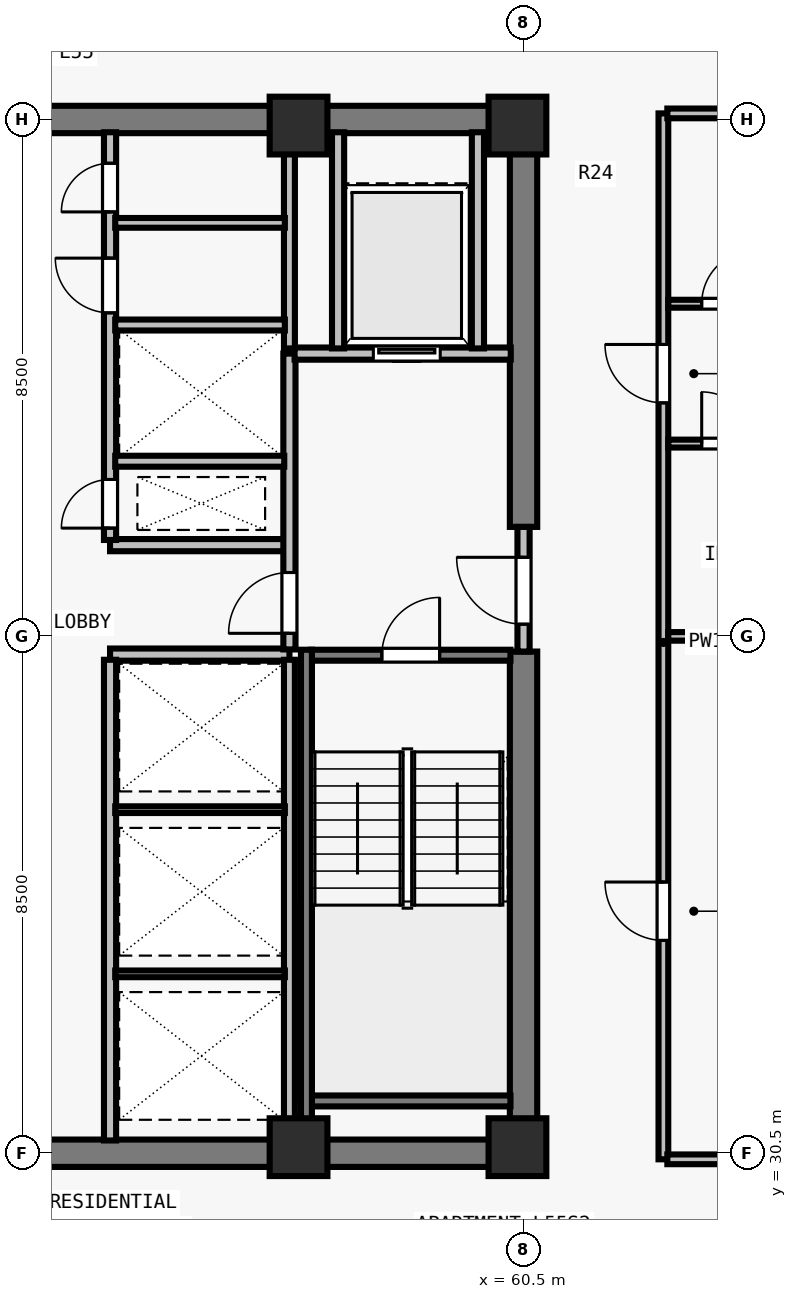
"""IFC4 building model, lengths in metres.
Left out: names, types, materials, properties, quantities, classifications, styles, units other than length and angle.
Written with IfcOpenShell. Run it as: python <this file> out.ifc"""

import sys

from ifc_helpers import new_model, si_unit, direction, frame, frame_2d, origin, origin_2d, place, context, subcontext, project, spatial, rectangle, extrude, element, fill, save


model = new_model("IFC4")
c1 = context("Model", 3, precision=1e-05, world=origin(), true_north=direction((0.0, 1.0)))
c2 = subcontext(c1, "Body", "Model", "MODEL_VIEW")
j1 = project(units=[si_unit("LENGTHUNIT", "METRE"), si_unit("PLANEANGLEUNIT", "RADIAN")], contexts=[c1])
p1 = place(None, origin())
s1 = spatial("IfcSite", under=j1, at=p1, CompositionType="ELEMENT")
p2 = place(p1, origin())
s2 = spatial("IfcBuilding", under=s1, at=p2, CompositionType="ELEMENT")
p3 = place(p2, frame((0.0, 0.0, 202.5)))
s3 = spatial("IfcBuildingStorey", under=s2, at=p3, CompositionType="ELEMENT", Elevation=202.5)
for number, where, z_axis, x_axis in (
    (1, (56.8, 30.6, 0.0), (0.0, 0.0, 1.0), (1.0, 0.0, 0.0)),
    (2, (60.4, 30.6, 0.0), (0.0, 0.0, 1.0), (1.0, 0.0, 0.0)),
    (3, (56.8, 47.4, 0.0), (0.0, 0.0, 1.0), (1.0, 0.0, 0.0)),
    (4, (60.4, 47.4, 0.0), (0.0, 0.0, 1.0), (1.0, 0.0, 0.0)),
):
    element("IfcColumn", number, at=place(p3, frame(where, z_axis=z_axis, x_axis=x_axis)), inside=s3, PredefinedType="COLUMN", context=c2, shape_type="SweptSolid", body=[
        extrude(rectangle(XDim=0.95, YDim=0.95, at=origin_2d()), origin(), (0.0, 0.0, 1.0), 3.5),
    ])
for number, where, z_axis, x_axis in (
    (5, (43.275, 30.5, 0.0), (0.0, 0.0, 1.0), (1.0, 0.0, 0.0)),
    (6, (43.275, 47.5, 0.0), (0.0, 0.0, 1.0), (1.0, 0.0, 0.0)),
):
    element("IfcWall", number, at=place(p3, frame(where, z_axis=z_axis, x_axis=x_axis)), inside=s3, PredefinedType="SHEAR", context=c2, shape_type="SweptSolid", body=[
        extrude(rectangle(XDim=17.45, YDim=0.45, at=frame_2d((8.725, 0.0))), origin(), (0.0, 0.0, 1.0), 3.29),
    ])
p4 = place(p3, frame((60.5, 30.715, 0.0), z_axis=(0.0, 0.0, 1.0), x_axis=(0.0, 1.0, 0.0)))
e7 = element("IfcWall", 7, at=p4, inside=s3, PredefinedType="SHEAR", context=c2, shape_type="SweptSolid", body=[
    extrude(rectangle(XDim=8.035, YDim=0.45, at=frame_2d((4.018, 0.0))), origin(), (0.0, 0.0, 1.0), 3.29),
])
p5 = place(p3, frame((60.5, 40.8, 0.0), z_axis=(0.0, 0.0, 1.0), x_axis=(0.0, 1.0, 0.0)))
e8 = element("IfcWall", 8, at=p5, inside=s3, PredefinedType="SHEAR", context=c2, shape_type="SweptSolid", body=[
    extrude(rectangle(XDim=6.485, YDim=0.45, at=frame_2d((3.242, 0.0))), origin(), (0.0, 0.0, 1.0), 3.29),
])
for number, where, z_axis, x_axis in (
    (9, (53.7, 38.7, 0.0), (0.0, 0.0, 1.0), (1.0, 0.0, 0.0)),
    (10, (53.7, 40.5, 0.0), (0.0, 0.0, 1.0), (1.0, 0.0, 0.0)),
):
    element("IfcWall", number, at=place(p3, frame(where, z_axis=z_axis, x_axis=x_axis)), inside=s3, PredefinedType="SOLIDWALL", context=c2, shape_type="SweptSolid", body=[
        extrude(rectangle(XDim=2.95, YDim=0.2, at=frame_2d((1.475, 0.0))), origin(), (0.0, 0.0, 1.0), 3.29),
    ])
p6 = place(p3, frame((53.7, 30.71, 0.0), z_axis=(0.0, 0.0, 1.0), x_axis=(0.0, 1.0, 0.0)))
e11 = element("IfcWall", 11, at=p6, inside=s3, PredefinedType="SOLIDWALL", context=c2, shape_type="SweptSolid", body=[
    extrude(rectangle(XDim=7.905, YDim=0.2, at=frame_2d((3.953, 0.0))), origin(), (0.0, 0.0, 1.0), 3.29),
])
p7 = place(p3, frame((53.7, 40.585, 0.0), z_axis=(0.0, 0.0, 1.0), x_axis=(0.0, 1.0, 0.0)))
e12 = element("IfcWall", 12, at=p7, inside=s3, PredefinedType="SOLIDWALL", context=c2, shape_type="SweptSolid", body=[
    extrude(rectangle(XDim=6.705, YDim=0.2, at=frame_2d((3.353, 0.0))), origin(), (0.0, 0.0, 1.0), 3.29),
])
p8 = place(p7, frame((0.195, 0.0, 0.0)))
e13 = element("IfcOpeningElement", 13, at=p8, cuts=e12, PredefinedType="OPENING", context=c2, shape_type="SweptSolid", body=[
    extrude(rectangle(XDim=0.8, YDim=2.08, at=frame_2d((0.4, 1.04))), frame((0.0, 0.11, 0.0), z_axis=(0.0, -1.0, 0.0), x_axis=(1.0, 0.0, 0.0)), (0.0, 0.0, 1.0), 0.22),
])
p9 = place(p7, frame((3.735, 0.0, 0.0)))
e14 = element("IfcOpeningElement", 14, at=p9, cuts=e12, PredefinedType="OPENING", context=c2, shape_type="SweptSolid", body=[
    extrude(rectangle(XDim=0.9, YDim=2.12, at=frame_2d((0.45, 1.06))), frame((0.0, 0.11, 0.0), z_axis=(0.0, -1.0, 0.0), x_axis=(1.0, 0.0, 0.0)), (0.0, 0.0, 1.0), 0.22),
])
p10 = place(p7, frame((5.395, 0.0, 0.0)))
e15 = element("IfcOpeningElement", 15, at=p10, cuts=e12, PredefinedType="OPENING", context=c2, shape_type="SweptSolid", body=[
    extrude(rectangle(XDim=0.8, YDim=2.1, at=frame_2d((0.4, 1.05))), frame((0.0, 0.11, 0.0), z_axis=(0.0, -1.0, 0.0), x_axis=(1.0, 0.0, 0.0)), (0.0, 0.0, 1.0), 0.22),
])
p11 = place(p3, frame((60.5, 38.75, 0.0), z_axis=(0.0, 0.0, 1.0), x_axis=(0.0, 1.0, 0.0)))
e16 = element("IfcWall", 16, at=p11, inside=s3, PredefinedType="SOLIDWALL", context=c2, shape_type="SweptSolid", body=[
    extrude(rectangle(XDim=2.05, YDim=0.2, at=frame_2d((1.025, 0.0))), origin(), (0.0, 0.0, 1.0), 3.29),
])
p12 = place(p11, frame((0.45, 0.0, 0.0)))
e17 = element("IfcOpeningElement", 17, at=p12, cuts=e16, PredefinedType="OPENING", context=c2, shape_type="SweptSolid", body=[
    extrude(rectangle(XDim=1.1, YDim=2.15, at=frame_2d((0.55, 1.075))), frame((0.0, 0.11, 0.0), z_axis=(0.0, -1.0, 0.0), x_axis=(1.0, 0.0, 0.0)), (0.0, 0.0, 1.0), 0.22),
])
p13 = place(p3, frame((56.65, 38.785, 0.0), z_axis=(0.0, 0.0, 1.0), x_axis=(0.0, 1.0, 0.0)))
e18 = element("IfcWall", 18, at=p13, inside=s3, PredefinedType="SOLIDWALL", context=c2, shape_type="SweptSolid", body=[
    extrude(rectangle(XDim=4.865, YDim=0.2, at=frame_2d((2.433, 0.0))), origin(), (0.0, 0.0, 1.0), 3.29),
])
p14 = place(p13, frame((0.265, 0.0, 0.0)))
e19 = element("IfcOpeningElement", 19, at=p14, cuts=e18, PredefinedType="OPENING", context=c2, shape_type="SweptSolid", body=[
    extrude(rectangle(XDim=1.0, YDim=2.15, at=frame_2d((0.5, 1.075))), frame((0.0, 0.11, 0.0), z_axis=(0.0, -1.0, 0.0), x_axis=(1.0, 0.0, 0.0)), (0.0, 0.0, 1.0), 0.22),
])
p15 = place(p3, frame((56.735, 43.65, 0.0), z_axis=(0.0, 0.0, 1.0), x_axis=(1.0, 0.0, 0.0)))
e20 = element("IfcWall", 20, at=p15, inside=s3, PredefinedType="SOLIDWALL", context=c2, shape_type="SweptSolid", body=[
    extrude(rectangle(XDim=3.555, YDim=0.2, at=frame_2d((1.777, 0.0))), origin(), (0.0, 0.0, 1.0), 3.29),
])
p16 = place(p15, frame((1.295, 0.0, 0.0)))
e21 = element("IfcOpeningElement", 21, at=p16, cuts=e20, PredefinedType="OPENING", context=c2, shape_type="SweptSolid", body=[
    extrude(rectangle(XDim=1.1, YDim=2.2, at=frame_2d((0.55, 1.1))), frame((0.0, 0.11, 0.0), z_axis=(0.0, -1.0, 0.0), x_axis=(1.0, 0.0, 0.0)), (0.0, 0.0, 1.0), 0.22),
])
for number, where, z_axis, x_axis in (
    (22, (57.45, 43.735, 0.0), (0.0, 0.0, 1.0), (0.0, 1.0, 0.0)),
    (23, (59.75, 43.735, 0.0), (0.0, 0.0, 1.0), (0.0, 1.0, 0.0)),
):
    element("IfcWall", number, at=place(p3, frame(where, z_axis=z_axis, x_axis=x_axis)), inside=s3, PredefinedType="SOLIDWALL", context=c2, shape_type="SweptSolid", body=[
        extrude(rectangle(XDim=3.555, YDim=0.2, at=frame_2d((1.777, 0.0))), origin(), (0.0, 0.0, 1.0), 3.29),
    ])
p17 = place(p3, frame((56.65, 30.71, 0.0), z_axis=(0.0, 0.0, 1.0), x_axis=(0.0, 1.0, 0.0)))
e24 = element("IfcWall", 24, at=p17, inside=s3, PredefinedType="SOLIDWALL", context=c2, shape_type="SweptSolid", body=[
    extrude(rectangle(XDim=7.905, YDim=0.18, at=frame_2d((3.953, 0.0))), origin(), (0.0, 0.0, 1.0), 3.29),
])
for number, where, z_axis, x_axis in (
    (25, (53.785, 33.45, 0.0), (0.0, 0.0, 1.0), (1.0, 0.0, 0.0)),
    (26, (53.785, 36.15, 0.0), (0.0, 0.0, 1.0), (1.0, 0.0, 0.0)),
):
    element("IfcWall", number, at=place(p3, frame(where, z_axis=z_axis, x_axis=x_axis)), inside=s3, PredefinedType="PARTITIONING", context=c2, shape_type="SweptSolid", body=[
        extrude(rectangle(XDim=2.79, YDim=0.11, at=frame_2d((1.395, 0.0))), origin(), (0.0, 0.0, 1.0), 3.29),
    ])
p18 = place(p3, frame((56.65, 43.735, 0.0), z_axis=(0.0, 0.0, 1.0), x_axis=(0.0, 1.0, 0.0)))
e27 = element("IfcWall", 27, at=p18, inside=s3, PredefinedType="SOLIDWALL", context=c2, shape_type="SweptSolid", body=[
    extrude(rectangle(XDim=3.555, YDim=0.18, at=frame_2d((1.777, 0.0))), origin(), (0.0, 0.0, 1.0), 3.29),
])
p19 = place(p3, frame((53.785, 41.88, 0.0), z_axis=(0.0, 0.0, 1.0), x_axis=(1.0, 0.0, 0.0)))
e28 = element("IfcWall", 28, at=p19, inside=s3, PredefinedType="SOLIDWALL", context=c2, shape_type="SweptSolid", body=[
    extrude(rectangle(XDim=2.78, YDim=0.18, at=frame_2d((1.39, 0.0))), origin(), (0.0, 0.0, 1.0), 3.29),
])
p20 = place(p3, frame((53.785, 44.12, 0.0), z_axis=(0.0, 0.0, 1.0), x_axis=(1.0, 0.0, 0.0)))
e29 = element("IfcWall", 29, at=p20, inside=s3, PredefinedType="SOLIDWALL", context=c2, shape_type="SweptSolid", body=[
    extrude(rectangle(XDim=2.79, YDim=0.18, at=frame_2d((1.395, 0.0))), origin(), (0.0, 0.0, 1.0), 3.29),
])
p21 = place(p3, frame((53.785, 45.8, 0.0), z_axis=(0.0, 0.0, 1.0), x_axis=(1.0, 0.0, 0.0)))
e30 = element("IfcWall", 30, at=p21, inside=s3, PredefinedType="PARTITIONING", context=c2, shape_type="SweptSolid", body=[
    extrude(rectangle(XDim=2.79, YDim=0.16, at=frame_2d((1.395, 0.0))), origin(), (0.0, 0.0, 1.0), 3.29),
])
p22 = place(p3, frame((62.8, 30.4, 0.0), z_axis=(0.0, 0.0, 1.0), x_axis=(0.0, 1.0, 0.0)))
e31 = element("IfcWall", 31, at=p22, inside=s3, PredefinedType="PARTITIONING", context=c2, shape_type="SweptSolid", body=[
    extrude(rectangle(XDim=17.2, YDim=0.16, at=frame_2d((8.6, 0.0))), origin(), (0.0, 0.0, 1.0), 3.29),
])
p23 = place(p22, frame((3.6, 0.0, 0.0)))
e32 = element("IfcOpeningElement", 32, at=p23, cuts=e31, PredefinedType="OPENING", context=c2, shape_type="SweptSolid", body=[
    extrude(rectangle(XDim=0.96, YDim=2.12, at=frame_2d((0.48, 1.06))), frame((0.0, 0.09, 0.0), z_axis=(0.0, -1.0, 0.0), x_axis=(1.0, 0.0, 0.0)), (0.0, 0.0, 1.0), 0.18),
])
p24 = place(p22, frame((12.44, 0.0, 0.0)))
e33 = element("IfcOpeningElement", 33, at=p24, cuts=e31, PredefinedType="OPENING", context=c2, shape_type="SweptSolid", body=[
    extrude(rectangle(XDim=0.96, YDim=2.18, at=frame_2d((0.48, 1.09))), frame((0.0, 0.09, 0.0), z_axis=(0.0, -1.0, 0.0), x_axis=(1.0, 0.0, 0.0)), (0.0, 0.0, 1.0), 0.18),
])
for number, where, z_axis, x_axis in (
    (34, (62.865, 30.4, 0.0), (0.0, 0.0, 1.0), (1.0, 0.0, 0.0)),
    (35, (62.865, 47.6, 0.0), (0.0, 0.0, 1.0), (1.0, 0.0, 0.0)),
):
    element("IfcWall", number, at=place(p3, frame(where, z_axis=z_axis, x_axis=x_axis)), inside=s3, PredefinedType="PARTITIONING", context=c2, shape_type="SweptSolid", body=[
        extrude(rectangle(XDim=11.33, YDim=0.16, at=frame_2d((5.665, 0.0))), origin(), (0.0, 0.0, 1.0), 3.29),
    ])
p25 = place(p3, frame((62.88, 39.0, 0.0), z_axis=(0.0, 0.0, 1.0), x_axis=(1.0, 0.0, 0.0)))
e36 = element("IfcWall", 36, at=p25, inside=s3, PredefinedType="PARTITIONING", context=c2, shape_type="SweptSolid", body=[
    extrude(rectangle(XDim=11.315, YDim=0.14, at=frame_2d((5.658, 0.0))), origin(), (0.0, 0.0, 1.0), 3.29),
])
p26 = place(p3, frame((62.88, 42.17, 0.0), z_axis=(0.0, 0.0, 1.0), x_axis=(1.0, 0.0, 0.0)))
e37 = element("IfcWall", 37, at=p26, inside=s3, PredefinedType="PLUMBINGWALL", context=c2, shape_type="SweptSolid", body=[
    extrude(rectangle(XDim=2.75, YDim=0.13, at=frame_2d((1.375, 0.0))), origin(), (0.0, 0.0, 1.0), 3.29),
])
p27 = place(p26, frame((0.55, 0.0, 0.0)))
e38 = element("IfcOpeningElement", 38, at=p27, cuts=e37, PredefinedType="OPENING", context=c2, shape_type="SweptSolid", body=[
    extrude(rectangle(XDim=0.85, YDim=2.08, at=frame_2d((0.425, 1.04))), frame((0.0, 0.075, 0.0), z_axis=(0.0, -1.0, 0.0), x_axis=(1.0, 0.0, 0.0)), (0.0, 0.0, 1.0), 0.15),
])
p28 = place(p3, frame((62.88, 44.47, 0.0), z_axis=(0.0, 0.0, 1.0), x_axis=(1.0, 0.0, 0.0)))
e39 = element("IfcWall", 39, at=p28, inside=s3, PredefinedType="PLUMBINGWALL", context=c2, shape_type="SweptSolid", body=[
    extrude(rectangle(XDim=2.75, YDim=0.13, at=frame_2d((1.375, 0.0))), origin(), (0.0, 0.0, 1.0), 3.29),
])
p29 = place(p28, frame((0.55, 0.0, 0.0)))
e40 = element("IfcOpeningElement", 40, at=p29, cuts=e39, PredefinedType="OPENING", context=c2, shape_type="SweptSolid", body=[
    extrude(rectangle(XDim=0.88, YDim=2.1, at=frame_2d((0.44, 1.05))), frame((0.0, 0.075, 0.0), z_axis=(0.0, -1.0, 0.0), x_axis=(1.0, 0.0, 0.0)), (0.0, 0.0, 1.0), 0.15),
])
p30 = place(p3, frame((57.005, 38.69, 0.0), z_axis=(0.0, 0.0, 1.0), x_axis=(1.0, 0.0, 0.0)))
e41 = element("IfcWall", 41, at=p30, inside=s3, PredefinedType="SOLIDWALL", context=c2, shape_type="SweptSolid", body=[
    extrude(rectangle(XDim=3.28, YDim=0.18, at=frame_2d((1.64, 0.0))), origin(), (0.0, 0.0, 1.0), 3.29),
])
p31 = place(p30, frame((1.165, 0.0, 0.0)))
e42 = element("IfcOpeningElement", 42, at=p31, cuts=e41, PredefinedType="OPENING", context=c2, shape_type="SweptSolid", body=[
    extrude(rectangle(XDim=0.95, YDim=2.15, at=frame_2d((0.475, 1.075))), frame((0.0, 0.1, 0.0), z_axis=(0.0, -1.0, 0.0), x_axis=(1.0, 0.0, 0.0)), (0.0, 0.0, 1.0), 0.2),
])
p32 = place(p3, frame((57.005, 31.36, 0.0), z_axis=(0.0, 0.0, 1.0), x_axis=(1.0, 0.0, 0.0)))
e43 = element("IfcWall", 43, at=p32, inside=s3, PredefinedType="SOLIDWALL", context=c2, shape_type="SweptSolid", body=[
    extrude(rectangle(XDim=3.28, YDim=0.18, at=frame_2d((1.64, 0.0))), origin(), (0.0, 0.0, 1.0), 3.29),
])
p33 = place(p3, frame((56.93, 38.78, 0.0), z_axis=(0.0, 0.0, 1.0), x_axis=(0.0, -1.0, 0.0)))
e44 = element("IfcWall", 44, at=p33, inside=s3, PredefinedType="SOLIDWALL", context=c2, shape_type="SweptSolid", body=[
    extrude(rectangle(XDim=8.067, YDim=0.18, at=frame_2d((4.034, 0.0))), origin(), (0.0, 0.0, 1.0), 3.29),
])
p34 = place(p12, origin())
e45 = element("IfcDoor", 45, at=p34, inside=s3, OperationType="SINGLE_SWING_RIGHT", PredefinedType="DOOR", context=c2, shape_type="SweptSolid", body=[
    extrude(rectangle(XDim=1.1, YDim=2.15, at=frame_2d((0.55, 1.075))), frame((0.0, 0.025, 0.0), z_axis=(0.0, -1.0, 0.0), x_axis=(1.0, 0.0, 0.0)), (0.0, 0.0, 1.0), 0.05),
])
fill(e17, e45)
p35 = place(p14, origin())
e46 = element("IfcDoor", 46, at=p35, inside=s3, OperationType="SINGLE_SWING_LEFT", PredefinedType="DOOR", context=c2, shape_type="SweptSolid", body=[
    extrude(rectangle(XDim=1.0, YDim=2.15, at=frame_2d((0.5, 1.075))), frame((0.0, 0.025, 0.0), z_axis=(0.0, -1.0, 0.0), x_axis=(1.0, 0.0, 0.0)), (0.0, 0.0, 1.0), 0.05),
])
fill(e19, e46)
p36 = place(p16, origin())
e47 = element("IfcDoor", 47, at=p36, inside=s3, OperationType="SLIDING_TO_LEFT", PredefinedType="DOOR", context=c2, shape_type="SweptSolid", body=[
    extrude(rectangle(XDim=1.1, YDim=2.2, at=frame_2d((0.55, 1.1))), frame((0.0, 0.025, 0.0), z_axis=(0.0, -1.0, 0.0), x_axis=(1.0, 0.0, 0.0)), (0.0, 0.0, 1.0), 0.05),
])
fill(e21, e47)
p37 = place(p8, origin())
e48 = element("IfcDoor", 48, at=p37, inside=s3, OperationType="SINGLE_SWING_LEFT", PredefinedType="DOOR", context=c2, shape_type="SweptSolid", body=[
    extrude(rectangle(XDim=0.8, YDim=2.08, at=frame_2d((0.4, 1.04))), frame((0.0, 0.025, 0.0), z_axis=(0.0, -1.0, 0.0), x_axis=(1.0, 0.0, 0.0)), (0.0, 0.0, 1.0), 0.05),
])
fill(e13, e48)
p38 = place(p9, origin())
e49 = element("IfcDoor", 49, at=p38, inside=s3, OperationType="SINGLE_SWING_RIGHT", PredefinedType="DOOR", context=c2, shape_type="SweptSolid", body=[
    extrude(rectangle(XDim=0.9, YDim=2.12, at=frame_2d((0.45, 1.06))), frame((0.0, 0.025, 0.0), z_axis=(0.0, -1.0, 0.0), x_axis=(1.0, 0.0, 0.0)), (0.0, 0.0, 1.0), 0.05),
])
fill(e14, e49)
p39 = place(p10, origin())
e50 = element("IfcDoor", 50, at=p39, inside=s3, OperationType="SINGLE_SWING_LEFT", PredefinedType="DOOR", context=c2, shape_type="SweptSolid", body=[
    extrude(rectangle(XDim=0.8, YDim=2.1, at=frame_2d((0.4, 1.05))), frame((0.0, 0.025, 0.0), z_axis=(0.0, -1.0, 0.0), x_axis=(1.0, 0.0, 0.0)), (0.0, 0.0, 1.0), 0.05),
])
fill(e15, e50)
p40 = place(p23, origin())
e51 = element("IfcDoor", 51, at=p40, inside=s3, OperationType="SINGLE_SWING_RIGHT", PredefinedType="DOOR", context=c2, shape_type="SweptSolid", body=[
    extrude(rectangle(XDim=0.96, YDim=2.12, at=frame_2d((0.48, 1.06))), frame((0.0, 0.025, 0.0), z_axis=(0.0, -1.0, 0.0), x_axis=(1.0, 0.0, 0.0)), (0.0, 0.0, 1.0), 0.05),
])
fill(e32, e51)
p41 = place(p27, origin())
e52 = element("IfcDoor", 52, at=p41, inside=s3, OperationType="SINGLE_SWING_LEFT", PredefinedType="DOOR", context=c2, shape_type="SweptSolid", body=[
    extrude(rectangle(XDim=0.85, YDim=2.08, at=frame_2d((0.425, 1.04))), frame((0.0, 0.025, 0.0), z_axis=(0.0, -1.0, 0.0), x_axis=(1.0, 0.0, 0.0)), (0.0, 0.0, 1.0), 0.05),
])
fill(e38, e52)
p42 = place(p29, origin())
e53 = element("IfcDoor", 53, at=p42, inside=s3, OperationType="SINGLE_SWING_RIGHT", PredefinedType="DOOR", context=c2, shape_type="SweptSolid", body=[
    extrude(rectangle(XDim=0.88, YDim=2.1, at=frame_2d((0.44, 1.05))), frame((0.0, 0.025, 0.0), z_axis=(0.0, -1.0, 0.0), x_axis=(1.0, 0.0, 0.0)), (0.0, 0.0, 1.0), 0.05),
])
fill(e40, e53)
p43 = place(p24, origin())
e54 = element("IfcDoor", 54, at=p43, inside=s3, OperationType="SINGLE_SWING_RIGHT", PredefinedType="DOOR", context=c2, shape_type="SweptSolid", body=[
    extrude(rectangle(XDim=0.96, YDim=2.18, at=frame_2d((0.48, 1.09))), frame((0.0, 0.025, 0.0), z_axis=(0.0, -1.0, 0.0), x_axis=(1.0, 0.0, 0.0)), (0.0, 0.0, 1.0), 0.05),
])
fill(e33, e54)
p44 = place(p31, origin())
e55 = element("IfcDoor", 55, at=p44, inside=s3, OperationType="SINGLE_SWING_RIGHT", PredefinedType="DOOR", context=c2, shape_type="SweptSolid", body=[
    extrude(rectangle(XDim=0.95, YDim=2.15, at=frame_2d((0.475, 1.075))), frame((0.0, 0.025, 0.0), z_axis=(0.0, -1.0, 0.0), x_axis=(1.0, 0.0, 0.0)), (0.0, 0.0, 1.0), 0.05),
])
fill(e42, e55)
save(model, sys.argv[1])
